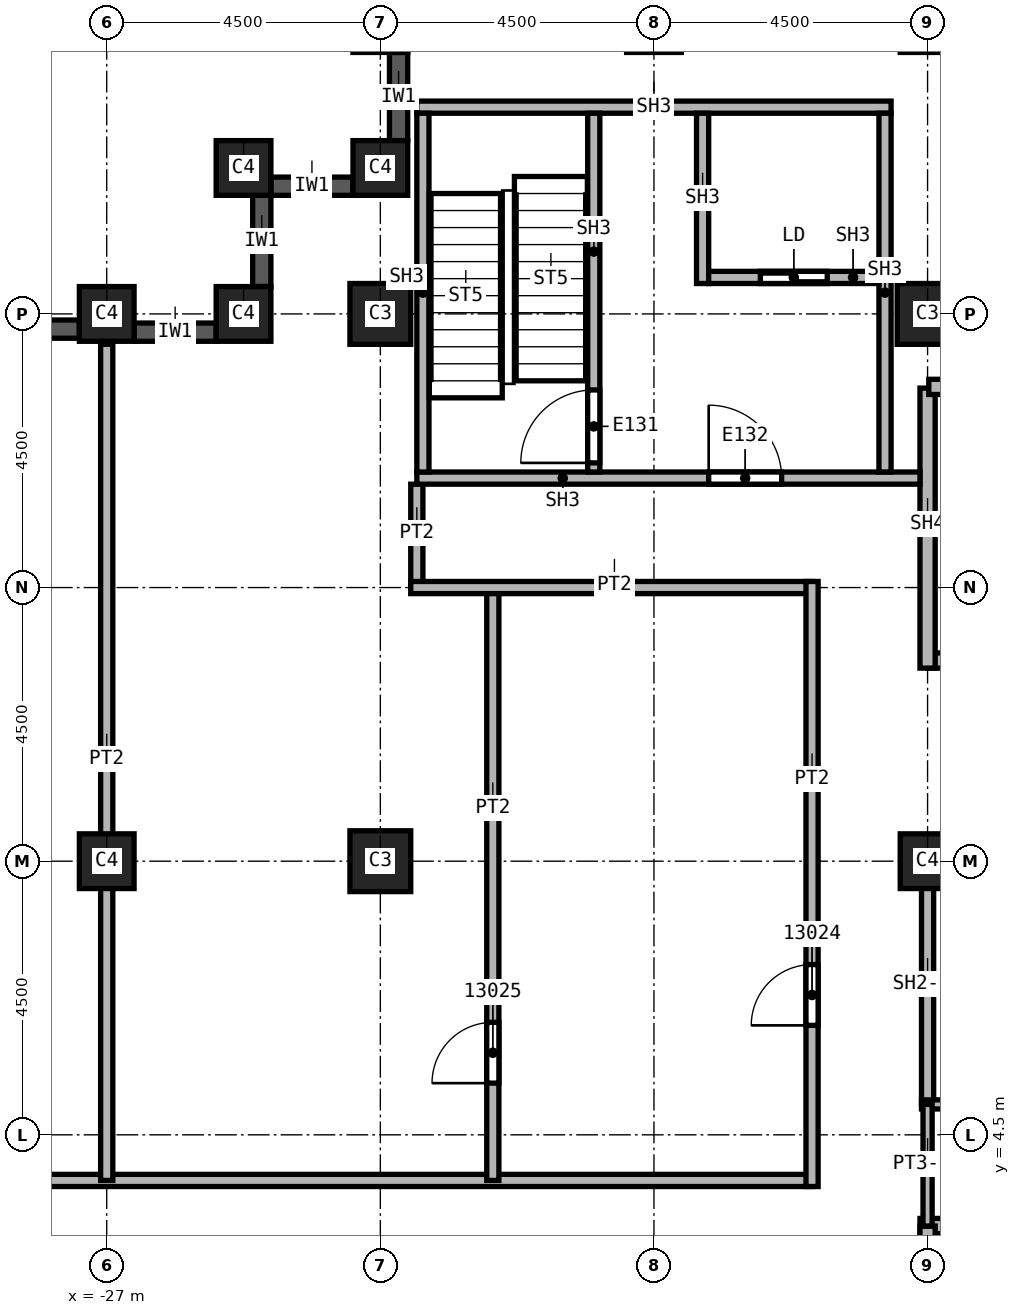
"""IFC4 building model, lengths in metres.
Left out: names, types, materials, properties, quantities, classifications, styles, units other than length and angle.
Written with IfcOpenShell. Run it as: python <this file> out.ifc"""

import sys

from ifc_helpers import new_model, si_unit, direction, frame, frame_2d, origin, origin_2d, place, context, subcontext, project, spatial, rectangle, extrude, element, fill, save


model = new_model("IFC4")
c1 = context("Model", 3, precision=1e-05, world=origin(), true_north=direction((0.0, 1.0)))
c2 = subcontext(c1, "Body", "Model", "MODEL_VIEW")
j1 = project(units=[si_unit("LENGTHUNIT", "METRE"), si_unit("PLANEANGLEUNIT", "RADIAN")], contexts=[c1])
p1 = place(None, origin())
s1 = spatial("IfcSite", under=j1, at=p1, CompositionType="ELEMENT")
p2 = place(p1, origin())
s2 = spatial("IfcBuilding", under=s1, at=p2, CompositionType="ELEMENT")
p3 = place(p2, frame((0.0, 0.0, 208.0)))
s3 = spatial("IfcBuildingStorey", under=s2, at=p3, CompositionType="ELEMENT", Elevation=208.0)
for number, where, z_axis, x_axis in (
    (1, (-13.5, 18.0, 0.0), (0.0, 0.0, 1.0), (1.0, 0.0, 0.0)),
    (2, (-22.5, 9.0, 0.0), (0.0, 0.0, 1.0), (1.0, 0.0, 0.0)),
    (3, (-22.5, 18.0, 0.0), (0.0, 0.0, 1.0), (1.0, 0.0, 0.0)),
):
    element("IfcColumn", number, at=place(p3, frame(where, z_axis=z_axis, x_axis=x_axis)), inside=s3, PredefinedType="COLUMN", context=c2, shape_type="SweptSolid", body=[
        extrude(rectangle(XDim=1.0, YDim=1.0, at=origin_2d()), origin(), (0.0, 0.0, 1.0), 3.72),
    ])
for number, where, z_axis, x_axis in (
    (4, (-13.5, 9.0, 0.0), (0.0, 0.0, 1.0), (1.0, 0.0, 0.0)),
    (5, (-27.0, 9.0, 0.0), (0.0, 0.0, 1.0), (1.0, 0.0, 0.0)),
    (6, (-27.0, 18.0, 0.0), (0.0, 0.0, 1.0), (1.0, 0.0, 0.0)),
    (7, (-22.5, 20.4, 0.0), (0.0, 0.0, 1.0), (1.0, 0.0, 0.0)),
    (8, (-24.75, 20.4, 0.0), (0.0, 0.0, 1.0), (1.0, 0.0, 0.0)),
    (9, (-24.75, 18.0, 0.0), (0.0, 0.0, 1.0), (1.0, 0.0, 0.0)),
):
    element("IfcColumn", number, at=place(p3, frame(where, z_axis=z_axis, x_axis=x_axis)), inside=s3, PredefinedType="COLUMN", context=c2, shape_type="SweptSolid", body=[
        extrude(rectangle(XDim=0.9, YDim=0.9, at=origin_2d()), origin(), (0.0, 0.0, 1.0), 3.72),
    ])
p4 = place(p3, frame((-22.95, 20.1, 0.0), z_axis=(0.0, 0.0, 1.0), x_axis=(-1.0, 0.0, 0.0)))
e10 = element("IfcWall", 10, at=p4, inside=s3, PredefinedType="SOLIDWALL", context=c2, shape_type="SweptSolid", body=[
    extrude(rectangle(XDim=1.35, YDim=0.3, at=frame_2d((0.675, 0.0))), origin(), (0.0, 0.0, 1.0), 3.12),
])
p5 = place(p3, frame((-24.45, 19.95, 0.0), z_axis=(0.0, 0.0, 1.0), x_axis=(0.0, -1.0, 0.0)))
e11 = element("IfcWall", 11, at=p5, inside=s3, PredefinedType="SOLIDWALL", context=c2, shape_type="SweptSolid", body=[
    extrude(rectangle(XDim=1.5, YDim=0.3, at=frame_2d((0.75, 0.0))), origin(), (0.0, 0.0, 1.0), 3.12),
])
p6 = place(p3, frame((-25.2, 17.7, 0.0), z_axis=(0.0, 0.0, 1.0), x_axis=(-1.0, 0.0, 0.0)))
e12 = element("IfcWall", 12, at=p6, inside=s3, PredefinedType="SOLIDWALL", context=c2, shape_type="SweptSolid", body=[
    extrude(rectangle(XDim=1.35, YDim=0.3, at=frame_2d((0.675, 0.0))), origin(), (0.0, 0.0, 1.0), 3.12),
])
p7 = place(p3, frame((-27.45, 17.75, 0.0), z_axis=(0.0, 0.0, 1.0), x_axis=(-1.0, 0.0, 0.0)))
e13 = element("IfcWall", 13, at=p7, inside=s3, PredefinedType="SOLIDWALL", context=c2, shape_type="SweptSolid", body=[
    extrude(rectangle(XDim=3.6, YDim=0.3, at=frame_2d((1.8, 0.0))), origin(), (0.0, 0.0, 1.0), 3.12),
])
p8 = place(p7, frame((0.6, 0.0, 0.8)))
e14 = element("IfcOpeningElement", 14, at=p8, cuts=e13, PredefinedType="OPENING", context=c2, shape_type="SweptSolid", body=[
    extrude(rectangle(XDim=2.4, YDim=1.95, at=frame_2d((1.2, 0.975))), frame((0.0, 0.15, 0.0), z_axis=(0.0, -1.0, 0.0), x_axis=(1.0, 0.0, 0.0)), (0.0, 0.0, 1.0), 0.3),
])
p9 = place(p3, frame((-22.2, 22.3, 0.0), z_axis=(0.0, 0.0, 1.0), x_axis=(0.0, -1.0, 0.0)))
e15 = element("IfcWall", 15, at=p9, inside=s3, PredefinedType="SOLIDWALL", context=c2, shape_type="SweptSolid", body=[
    extrude(rectangle(XDim=1.45, YDim=0.3, at=frame_2d((0.725, 0.0))), origin(), (0.0, 0.0, 1.0), 3.12),
])
p10 = place(p3, frame((-33.85, 3.75, 0.0), z_axis=(0.0, 0.0, 1.0), x_axis=(1.0, 0.0, 0.0)))
e16 = element("IfcWall", 16, at=p10, inside=s3, PredefinedType="PARTITIONING", context=c2, shape_type="SweptSolid", body=[
    extrude(rectangle(XDim=18.45, YDim=0.2, at=frame_2d((9.225, 0.0))), origin(), (0.0, 0.0, 1.0), 3.72),
])
p11 = place(p3, frame((-27.0, 3.75, 0.0), z_axis=(0.0, 0.0, 1.0), x_axis=(0.0, 1.0, 0.0)))
e17 = element("IfcWall", 17, at=p11, inside=s3, PredefinedType="PARTITIONING", context=c2, shape_type="SweptSolid", body=[
    extrude(rectangle(XDim=13.75, YDim=0.2, at=frame_2d((6.875, 0.0))), origin(), (0.0, 0.0, 1.0), 3.72),
])
p12 = place(p3, frame((-21.9, 13.5, 0.0), z_axis=(0.0, 0.0, 1.0), x_axis=(0.0, 1.0, 0.0)))
e18 = element("IfcWall", 18, at=p12, inside=s3, PredefinedType="PARTITIONING", context=c2, shape_type="SweptSolid", body=[
    extrude(rectangle(XDim=1.7, YDim=0.2, at=frame_2d((0.85, 0.0))), origin(), (0.0, 0.0, 1.0), 3.72),
])
p13 = place(p3, frame((-20.65, 3.75, 0.0), z_axis=(0.0, 0.0, 1.0), x_axis=(0.0, 1.0, 0.0)))
e19 = element("IfcWall", 19, at=p13, inside=s3, PredefinedType="PARTITIONING", context=c2, shape_type="SweptSolid", body=[
    extrude(rectangle(XDim=9.75, YDim=0.2, at=frame_2d((4.875, 0.0))), origin(), (0.0, 0.0, 1.0), 3.72),
])
p14 = place(p13, frame((1.6, 0.0, 0.0)))
e20 = element("IfcOpeningElement", 20, at=p14, cuts=e19, PredefinedType="OPENING", context=c2, shape_type="SweptSolid", body=[
    extrude(rectangle(XDim=1.0, YDim=2.1, at=frame_2d((0.5, 1.05))), frame((0.0, 0.1, 0.0), z_axis=(0.0, -1.0, 0.0), x_axis=(1.0, 0.0, 0.0)), (0.0, 0.0, 1.0), 0.2),
])
p15 = place(p3, frame((-15.4, 13.5, 0.0), z_axis=(0.0, 0.0, 1.0), x_axis=(-1.0, 0.0, 0.0)))
e21 = element("IfcWall", 21, at=p15, inside=s3, PredefinedType="PARTITIONING", context=c2, shape_type="SweptSolid", body=[
    extrude(rectangle(XDim=6.6, YDim=0.2, at=frame_2d((3.3, 0.0))), origin(), (0.0, 0.0, 1.0), 3.72),
])
p16 = place(p3, frame((-15.4, 3.65, 0.0), z_axis=(0.0, 0.0, 1.0), x_axis=(0.0, 1.0, 0.0)))
e22 = element("IfcWall", 22, at=p16, inside=s3, PredefinedType="PARTITIONING", context=c2, shape_type="SweptSolid", body=[
    extrude(rectangle(XDim=9.95, YDim=0.2, at=frame_2d((4.975, 0.0))), origin(), (0.0, 0.0, 1.0), 3.72),
])
p17 = place(p16, frame((2.65, 0.0, 0.0)))
e23 = element("IfcOpeningElement", 23, at=p17, cuts=e22, PredefinedType="OPENING", context=c2, shape_type="SweptSolid", body=[
    extrude(rectangle(XDim=1.0, YDim=2.1, at=frame_2d((0.5, 1.05))), frame((0.0, 0.1, 0.0), z_axis=(0.0, -1.0, 0.0), x_axis=(1.0, 0.0, 0.0)), (0.0, 0.0, 1.0), 0.2),
])
p18 = place(p3, frame((-13.5, 5.0, 0.0), z_axis=(0.0, 0.0, 1.0), x_axis=(0.0, 1.0, 0.0)))
e24 = element("IfcWall", 24, at=p18, inside=s3, PredefinedType="SOLIDWALL", context=c2, shape_type="SweptSolid", body=[
    extrude(rectangle(XDim=4.1, YDim=0.2, at=frame_2d((2.05, 0.0))), origin(), (0.0, 0.0, 1.0), 2.958),
])
p19 = place(p3, frame((-13.5, 9.0, 0.0), z_axis=(0.0, 0.0, 1.0), x_axis=(1.0, 0.0, 0.0)))
e25 = element("IfcWall", 25, at=p19, inside=s3, PredefinedType="SOLIDWALL", context=c2, shape_type="SweptSolid", body=[
    extrude(rectangle(XDim=3.0, YDim=0.2, at=frame_2d((1.5, 0.0))), origin(), (0.0, 0.0, 1.0), 2.958),
])
p20 = place(p3, frame((-13.625, 3.0, 0.0), z_axis=(0.0, 0.0, 1.0), x_axis=(1.0, 0.0, 0.0)))
e26 = element("IfcWall", 26, at=p20, inside=s3, PredefinedType="SOLIDWALL", context=c2, shape_type="SweptSolid", body=[
    extrude(rectangle(XDim=9.25, YDim=0.25, at=frame_2d((4.625, 0.0))), origin(), (0.0, 0.0, 1.0), 3.72),
])
p21 = place(p20, frame((3.25, 0.0, 0.0)))
e27 = element("IfcOpeningElement", 27, at=p21, cuts=e26, PredefinedType="OPENING", context=c2, shape_type="SweptSolid", body=[
    extrude(rectangle(XDim=1.1, YDim=2.1, at=frame_2d((0.55, 1.05))), frame((0.0, 0.125, 0.0), z_axis=(0.0, -1.0, 0.0), x_axis=(1.0, 0.0, 0.0)), (0.0, 0.0, 1.0), 0.25),
])
p22 = place(p3, frame((-13.5, -3.0, 0.0), z_axis=(0.0, 0.0, 1.0), x_axis=(0.0, 1.0, 0.0)))
e28 = element("IfcWall", 28, at=p22, inside=s3, PredefinedType="SOLIDWALL", context=c2, shape_type="SweptSolid", body=[
    extrude(rectangle(XDim=6.0, YDim=0.25, at=frame_2d((3.0, 0.0))), origin(), (0.0, 0.0, 1.0), 2.958),
])
p23 = place(p3, frame((-13.5, 12.3, 0.0), z_axis=(0.0, 0.0, 1.0), x_axis=(1.0, 0.0, 0.0)))
e29 = element("IfcWall", 29, at=p23, inside=s3, PredefinedType="SOLIDWALL", context=c2, shape_type="SweptSolid", body=[
    extrude(rectangle(XDim=9.125, YDim=0.25, at=frame_2d((4.562, 0.0))), origin(), (0.0, 0.0, 1.0), 3.72),
])
p24 = place(p23, frame((0.6, 0.0, 0.0)))
e30 = element("IfcOpeningElement", 30, at=p24, cuts=e29, PredefinedType="OPENING", context=c2, shape_type="SweptSolid", body=[
    extrude(rectangle(XDim=1.2, YDim=2.1, at=frame_2d((0.6, 1.05))), frame((0.0, 0.125, 0.0), z_axis=(0.0, -1.0, 0.0), x_axis=(1.0, 0.0, 0.0)), (0.0, 0.0, 1.0), 0.25),
])
p25 = place(p3, frame((-13.5, 16.78, 0.0), z_axis=(0.0, 0.0, 1.0), x_axis=(0.0, -1.0, 0.0)))
e31 = element("IfcWall", 31, at=p25, inside=s3, PredefinedType="SOLIDWALL", context=c2, shape_type="SweptSolid", body=[
    extrude(rectangle(XDim=4.605, YDim=0.25, at=frame_2d((2.302, 0.0))), origin(), (0.0, 0.0, 1.0), 3.72),
])
p26 = place(p3, frame((-13.48, 16.8, 0.0), z_axis=(0.0, 0.0, 1.0), x_axis=(1.0, 0.0, 0.0)))
e32 = element("IfcWall", 32, at=p26, inside=s3, PredefinedType="SOLIDWALL", context=c2, shape_type="SweptSolid", body=[
    extrude(rectangle(XDim=8.96, YDim=0.25, at=frame_2d((4.48, 0.0))), origin(), (0.0, 0.0, 1.0), 3.72),
])
p27 = place(p3, frame((-13.6, 5.0, 0.0), z_axis=(0.0, 0.0, 1.0), x_axis=(1.0, 0.0, 0.0)))
e33 = element("IfcWall", 33, at=p27, inside=s3, PredefinedType="PARTITIONING", context=c2, shape_type="SweptSolid", body=[
    extrude(rectangle(XDim=3.1, YDim=0.15, at=frame_2d((1.55, 0.0))), origin(), (0.0, 0.0, 1.0), 3.72),
])
p28 = place(p3, frame((-13.5, 3.0, 0.0), z_axis=(0.0, 0.0, 1.0), x_axis=(0.0, 1.0, 0.0)))
e34 = element("IfcWall", 34, at=p28, inside=s3, PredefinedType="PARTITIONING", context=c2, shape_type="SweptSolid", body=[
    extrude(rectangle(XDim=2.0, YDim=0.15, at=frame_2d((1.0, 0.0))), origin(), (0.0, 0.0, 1.0), 2.958),
])
p29 = place(p3, frame((-21.9, 15.3, 0.0), z_axis=(0.0, 0.0, 1.0), x_axis=(1.0, 0.0, 0.0)))
e35 = element("IfcWall", 35, at=p29, inside=s3, PredefinedType="SOLIDWALL", context=c2, shape_type="SweptSolid", body=[
    extrude(rectangle(XDim=8.275, YDim=0.2, at=frame_2d((4.137, 0.0))), origin(), (0.0, 0.0, 1.0), 3.72),
])
p30 = place(p29, frame((4.8, 0.0, 0.0)))
e36 = element("IfcOpeningElement", 36, at=p30, cuts=e35, PredefinedType="OPENING", context=c2, shape_type="SweptSolid", body=[
    extrude(rectangle(XDim=1.2, YDim=2.1, at=frame_2d((0.6, 1.05))), frame((0.0, 0.1, 0.0), z_axis=(0.0, -1.0, 0.0), x_axis=(1.0, 0.0, 0.0)), (0.0, 0.0, 1.0), 0.2),
])
p31 = place(p3, frame((-21.9, 21.4, 0.0), z_axis=(0.0, 0.0, 1.0), x_axis=(1.0, 0.0, 0.0)))
e37 = element("IfcWall", 37, at=p31, inside=s3, PredefinedType="SOLIDWALL", context=c2, shape_type="SweptSolid", body=[
    extrude(rectangle(XDim=7.8, YDim=0.2, at=frame_2d((3.9, 0.0))), origin(), (0.0, 0.0, 1.0), 3.72),
])
for number, where, z_axis, x_axis in (
    (38, (-21.8, 15.4, 0.0), (0.0, 0.0, 1.0), (0.0, 1.0, 0.0)),
    (39, (-14.2, 15.4, 0.0), (0.0, 0.0, 1.0), (0.0, 1.0, 0.0)),
):
    element("IfcWall", number, at=place(p3, frame(where, z_axis=z_axis, x_axis=x_axis)), inside=s3, PredefinedType="SOLIDWALL", context=c2, shape_type="SweptSolid", body=[
        extrude(rectangle(XDim=5.9, YDim=0.2, at=frame_2d((2.95, 0.0))), origin(), (0.0, 0.0, 1.0), 3.72),
    ])
p32 = place(p3, frame((-18.99, 15.4, 0.0), z_axis=(0.0, 0.0, 1.0), x_axis=(0.0, 1.0, 0.0)))
e40 = element("IfcWall", 40, at=p32, inside=s3, PredefinedType="SOLIDWALL", context=c2, shape_type="SweptSolid", body=[
    extrude(rectangle(XDim=5.9, YDim=0.2, at=frame_2d((2.95, 0.0))), origin(), (0.0, 0.0, 1.0), 3.72),
])
p33 = place(p32, frame((0.15, 0.0, 0.0)))
e41 = element("IfcOpeningElement", 41, at=p33, cuts=e40, PredefinedType="OPENING", context=c2, shape_type="SweptSolid", body=[
    extrude(rectangle(XDim=1.2, YDim=2.1, at=frame_2d((0.6, 1.05))), frame((0.0, 0.1, 0.0), z_axis=(0.0, -1.0, 0.0), x_axis=(1.0, 0.0, 0.0)), (0.0, 0.0, 1.0), 0.2),
])
p34 = place(p3, frame((-17.2, 18.5, 0.0), z_axis=(0.0, 0.0, 1.0), x_axis=(0.0, 1.0, 0.0)))
e42 = element("IfcWall", 42, at=p34, inside=s3, PredefinedType="SOLIDWALL", context=c2, shape_type="SweptSolid", body=[
    extrude(rectangle(XDim=2.8, YDim=0.2, at=frame_2d((1.4, 0.0))), origin(), (0.0, 0.0, 1.0), 3.72),
])
p35 = place(p3, frame((-17.1, 18.6, 0.0), z_axis=(0.0, 0.0, 1.0), x_axis=(1.0, 0.0, 0.0)))
e43 = element("IfcWall", 43, at=p35, inside=s3, PredefinedType="SOLIDWALL", context=c2, shape_type="SweptSolid", body=[
    extrude(rectangle(XDim=2.8, YDim=0.2, at=frame_2d((1.4, 0.0))), origin(), (0.0, 0.0, 1.0), 3.72),
])
p36 = place(p35, frame((0.85, 0.0, 0.0)))
e44 = element("IfcOpeningElement", 44, at=p36, cuts=e43, PredefinedType="OPENING", context=c2, shape_type="SweptSolid", body=[
    extrude(rectangle(XDim=1.1, YDim=2.1, at=frame_2d((0.55, 1.05))), frame((0.0, 0.1, 0.0), z_axis=(0.0, -1.0, 0.0), x_axis=(1.0, 0.0, 0.0)), (0.0, 0.0, 1.0), 0.2),
])
p37 = place(p17, origin())
e45 = element("IfcDoor", 45, at=p37, inside=s3, OperationType="SINGLE_SWING_LEFT", PredefinedType="DOOR", context=c2, shape_type="SweptSolid", body=[
    extrude(rectangle(XDim=1.0, YDim=2.1, at=frame_2d((0.5, 1.05))), frame((0.0, 0.025, 0.0), z_axis=(0.0, -1.0, 0.0), x_axis=(1.0, 0.0, 0.0)), (0.0, 0.0, 1.0), 0.05),
])
fill(e23, e45)
p38 = place(p14, origin())
e46 = element("IfcDoor", 46, at=p38, inside=s3, OperationType="SINGLE_SWING_RIGHT", PredefinedType="DOOR", context=c2, shape_type="SweptSolid", body=[
    extrude(rectangle(XDim=1.0, YDim=2.1, at=frame_2d((0.5, 1.05))), frame((0.0, 0.025, 0.0), z_axis=(0.0, -1.0, 0.0), x_axis=(1.0, 0.0, 0.0)), (0.0, 0.0, 1.0), 0.05),
])
fill(e20, e46)
p39 = place(p33, origin())
e47 = element("IfcDoor", 47, at=p39, inside=s3, OperationType="SINGLE_SWING_LEFT", PredefinedType="DOOR", context=c2, shape_type="SweptSolid", body=[
    extrude(rectangle(XDim=1.2, YDim=2.1, at=frame_2d((0.6, 1.05))), frame((0.0, 0.025, 0.0), z_axis=(0.0, -1.0, 0.0), x_axis=(1.0, 0.0, 0.0)), (0.0, 0.0, 1.0), 0.05),
])
fill(e41, e47)
p40 = place(p36, origin())
e48 = element("IfcDoor", 48, at=p40, inside=s3, OperationType="SLIDING_TO_LEFT", PredefinedType="DOOR", context=c2, shape_type="SweptSolid", body=[
    extrude(rectangle(XDim=1.1, YDim=2.1, at=frame_2d((0.55, 1.05))), frame((0.0, 0.025, 0.0), z_axis=(0.0, -1.0, 0.0), x_axis=(1.0, 0.0, 0.0)), (0.0, 0.0, 1.0), 0.05),
])
fill(e44, e48)
p41 = place(p30, origin())
e49 = element("IfcDoor", 49, at=p41, inside=s3, OperationType="SINGLE_SWING_RIGHT", PredefinedType="DOOR", context=c2, shape_type="SweptSolid", body=[
    extrude(rectangle(XDim=1.2, YDim=2.1, at=frame_2d((0.6, 1.05))), frame((0.0, 0.025, 0.0), z_axis=(0.0, -1.0, 0.0), x_axis=(1.0, 0.0, 0.0)), (0.0, 0.0, 1.0), 0.05),
])
fill(e36, e49)
save(model, sys.argv[1])
